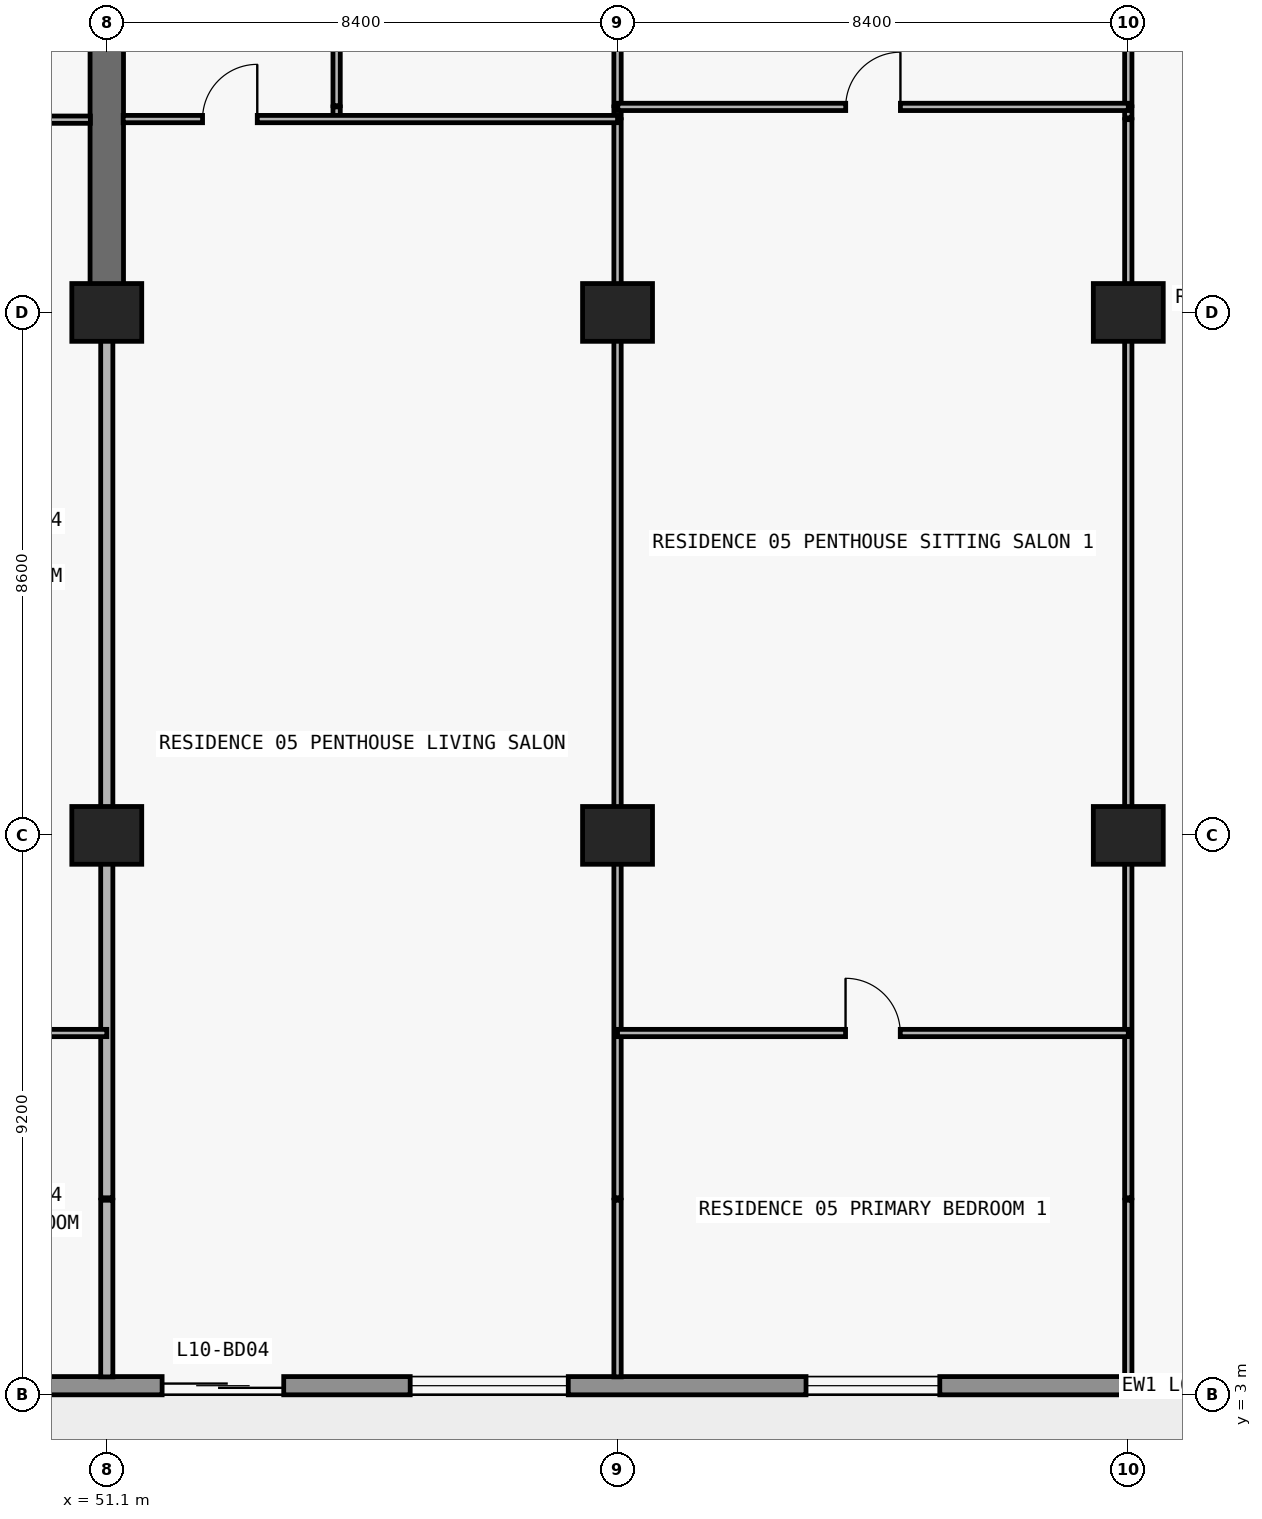
"""IFC4 building model, lengths in metres.
Left out: names, types, materials, properties, quantities, classifications, styles, units other than length and angle.
Written with IfcOpenShell. Run it as: python <this file> out.ifc"""

import sys

from ifc_helpers import new_model, si_unit, direction, frame, frame_2d, origin, origin_2d, place, context, subcontext, project, spatial, rectangle, extrude, element, fill, save


model = new_model("IFC4")
c1 = context("Model", 3, precision=1e-05, world=origin(), true_north=direction((0.0, 1.0)))
c2 = subcontext(c1, "Body", "Model", "MODEL_VIEW")
j1 = project(units=[si_unit("LENGTHUNIT", "METRE"), si_unit("PLANEANGLEUNIT", "RADIAN")], contexts=[c1])
p1 = place(None, origin())
s1 = spatial("IfcSite", under=j1, at=p1, CompositionType="ELEMENT")
p2 = place(p1, origin())
s2 = spatial("IfcBuilding", under=s1, at=p2, CompositionType="ELEMENT")
p3 = place(p2, frame((0.0, 0.0, 43.2)))
s3 = spatial("IfcBuildingStorey", under=s2, at=p3, CompositionType="ELEMENT", Elevation=43.2)
for number, where, z_axis, x_axis in (
    (1, (51.1, 12.2, 0.0), (0.0, 0.0, 1.0), (1.0, 0.0, 0.0)),
    (2, (59.5, 12.2, 0.0), (0.0, 0.0, 1.0), (1.0, 0.0, 0.0)),
    (3, (67.9, 12.2, 0.0), (0.0, 0.0, 1.0), (1.0, 0.0, 0.0)),
    (4, (51.1, 20.8, 0.0), (0.0, 0.0, 1.0), (1.0, 0.0, 0.0)),
    (5, (59.5, 20.8, 0.0), (0.0, 0.0, 1.0), (1.0, 0.0, 0.0)),
    (6, (67.9, 20.8, 0.0), (0.0, 0.0, 1.0), (1.0, 0.0, 0.0)),
):
    element("IfcColumn", number, at=place(p3, frame(where, z_axis=z_axis, x_axis=x_axis)), inside=s3, PredefinedType="COLUMN", context=c2, shape_type="SweptSolid", body=[
        extrude(rectangle(XDim=1.15, YDim=0.95, at=origin_2d()), origin(), (0.0, 0.0, 1.0), 3.05),
    ])
p4 = place(p3, frame((51.1, 20.8, 0.0), z_axis=(0.0, 0.0, 1.0), x_axis=(0.0, 1.0, 0.0)))
e7 = element("IfcWall", 7, at=p4, inside=s3, PredefinedType="SHEAR", context=c2, shape_type="SweptSolid", body=[
    extrude(rectangle(XDim=8.6, YDim=0.55, at=frame_2d((4.3, 0.0))), origin(), (0.0, 0.0, 1.0), 3.05),
])
p5 = place(p3, frame((72.7, 3.15, 0.0), z_axis=(0.0, 0.0, 1.0), x_axis=(-1.0, 0.0, 0.0)))
e8 = element("IfcWall", 8, at=p5, inside=s3, PredefinedType="STANDARD", context=c2, shape_type="SweptSolid", body=[
    extrude(rectangle(XDim=67.6, YDim=0.3, at=frame_2d((33.8, 0.0))), origin(), (0.0, 0.0, 1.0), 3.05),
])
p6 = place(p5, frame((59.89, 0.0, 0.0)))
e9 = element("IfcOpeningElement", 9, at=p6, cuts=e8, PredefinedType="OPENING", context=c2, shape_type="SweptSolid", body=[
    extrude(rectangle(XDim=2.0, YDim=2.3, at=frame_2d((1.0, 1.15))), frame((0.0, 0.16, 0.0), z_axis=(0.0, -1.0, 0.0), x_axis=(1.0, 0.0, 0.0)), (0.0, 0.0, 1.0), 0.32),
])
p7 = place(p5, frame((55.21, 0.0, 0.65)))
e10 = element("IfcOpeningElement", 10, at=p7, cuts=e8, PredefinedType="OPENING", context=c2, shape_type="SweptSolid", body=[
    extrude(rectangle(XDim=2.6, YDim=1.85, at=frame_2d((1.3, 0.925))), frame((0.0, 0.16, 0.0), z_axis=(0.0, -1.0, 0.0), x_axis=(1.0, 0.0, 0.0)), (0.0, 0.0, 1.0), 0.32),
])
p8 = place(p5, frame((49.1, 0.0, 0.85)))
e11 = element("IfcOpeningElement", 11, at=p8, cuts=e8, PredefinedType="OPENING", context=c2, shape_type="SweptSolid", body=[
    extrude(rectangle(XDim=2.2, YDim=1.55, at=frame_2d((1.1, 0.775))), frame((0.0, 0.16, 0.0), z_axis=(0.0, -1.0, 0.0), x_axis=(1.0, 0.0, 0.0)), (0.0, 0.0, 1.0), 0.32),
])
p9 = place(p5, frame((42.69, 0.0, 0.0)))
e12 = element("IfcOpeningElement", 12, at=p9, cuts=e8, PredefinedType="OPENING", context=c2, shape_type="SweptSolid", body=[
    extrude(rectangle(XDim=2.0, YDim=2.3, at=frame_2d((1.0, 1.15))), frame((0.0, 0.16, 0.0), z_axis=(0.0, -1.0, 0.0), x_axis=(1.0, 0.0, 0.0)), (0.0, 0.0, 1.0), 0.32),
])
p10 = place(p5, frame((38.59, 0.0, 0.85)))
e13 = element("IfcOpeningElement", 13, at=p10, cuts=e8, PredefinedType="OPENING", context=c2, shape_type="SweptSolid", body=[
    extrude(rectangle(XDim=1.8, YDim=1.55, at=frame_2d((0.9, 0.775))), frame((0.0, 0.16, 0.0), z_axis=(0.0, -1.0, 0.0), x_axis=(1.0, 0.0, 0.0)), (0.0, 0.0, 1.0), 0.32),
])
p11 = place(p5, frame((30.914, 0.0, 0.85)))
e14 = element("IfcOpeningElement", 14, at=p11, cuts=e8, PredefinedType="OPENING", context=c2, shape_type="SweptSolid", body=[
    extrude(rectangle(XDim=2.2, YDim=1.55, at=frame_2d((1.1, 0.775))), frame((0.0, 0.16, 0.0), z_axis=(0.0, -1.0, 0.0), x_axis=(1.0, 0.0, 0.0)), (0.0, 0.0, 1.0), 0.32),
])
p12 = place(p5, frame((26.69, 0.0, 0.0)))
e15 = element("IfcOpeningElement", 15, at=p12, cuts=e8, PredefinedType="OPENING", context=c2, shape_type="SweptSolid", body=[
    extrude(rectangle(XDim=2.0, YDim=2.3, at=frame_2d((1.0, 1.15))), frame((0.0, 0.16, 0.0), z_axis=(0.0, -1.0, 0.0), x_axis=(1.0, 0.0, 0.0)), (0.0, 0.0, 1.0), 0.32),
])
p13 = place(p5, frame((22.59, 0.0, 0.85)))
e16 = element("IfcOpeningElement", 16, at=p13, cuts=e8, PredefinedType="OPENING", context=c2, shape_type="SweptSolid", body=[
    extrude(rectangle(XDim=1.8, YDim=1.55, at=frame_2d((0.9, 0.775))), frame((0.0, 0.16, 0.0), z_axis=(0.0, -1.0, 0.0), x_axis=(1.0, 0.0, 0.0)), (0.0, 0.0, 1.0), 0.32),
])
p14 = place(p5, frame((18.69, 0.0, 0.0)))
e17 = element("IfcOpeningElement", 17, at=p14, cuts=e8, PredefinedType="OPENING", context=c2, shape_type="SweptSolid", body=[
    extrude(rectangle(XDim=2.0, YDim=2.3, at=frame_2d((1.0, 1.15))), frame((0.0, 0.16, 0.0), z_axis=(0.0, -1.0, 0.0), x_axis=(1.0, 0.0, 0.0)), (0.0, 0.0, 1.0), 0.32),
])
p15 = place(p5, frame((14.01, 0.0, 0.65)))
e18 = element("IfcOpeningElement", 18, at=p15, cuts=e8, PredefinedType="OPENING", context=c2, shape_type="SweptSolid", body=[
    extrude(rectangle(XDim=2.6, YDim=1.85, at=frame_2d((1.3, 0.925))), frame((0.0, 0.16, 0.0), z_axis=(0.0, -1.0, 0.0), x_axis=(1.0, 0.0, 0.0)), (0.0, 0.0, 1.0), 0.32),
])
p16 = place(p5, frame((7.9, 0.0, 0.85)))
e19 = element("IfcOpeningElement", 19, at=p16, cuts=e8, PredefinedType="OPENING", context=c2, shape_type="SweptSolid", body=[
    extrude(rectangle(XDim=2.2, YDim=1.55, at=frame_2d((1.1, 0.775))), frame((0.0, 0.16, 0.0), z_axis=(0.0, -1.0, 0.0), x_axis=(1.0, 0.0, 0.0)), (0.0, 0.0, 1.0), 0.32),
])
p17 = place(p3, frame((51.1, 3.295, 0.0), z_axis=(0.0, 0.0, 1.0), x_axis=(0.0, 1.0, 0.0)))
e20 = element("IfcWall", 20, at=p17, inside=s3, PredefinedType="PARTITIONING", context=c2, shape_type="SweptSolid", body=[
    extrude(rectangle(XDim=2.905, YDim=0.2, at=frame_2d((1.453, 0.0))), origin(), (0.0, 0.0, 1.0), 3.05),
])
p18 = place(p3, frame((51.1, 6.24, 0.0), z_axis=(0.0, 0.0, 1.0), x_axis=(0.0, 1.0, 0.0)))
e21 = element("IfcWall", 21, at=p18, inside=s3, PredefinedType="PARTITIONING", context=c2, shape_type="SweptSolid", body=[
    extrude(rectangle(XDim=14.555, YDim=0.2, at=frame_2d((7.277, 0.0))), origin(), (0.0, 0.0, 1.0), 2.11),
])
p19 = place(p3, frame((54.88, 24.0, 0.0), z_axis=(0.0, 0.0, 1.0), x_axis=(0.0, 1.0, 0.0)))
e22 = element("IfcWall", 22, at=p19, inside=s3, PredefinedType="PARTITIONING", context=c2, shape_type="SweptSolid", body=[
    extrude(rectangle(XDim=0.18, YDim=0.12, at=frame_2d((0.09, 0.0))), origin(), (0.0, 0.0, 1.0), 3.05),
])
p20 = place(p3, frame((54.88, 24.2, 0.0), z_axis=(0.0, 0.0, 1.0), x_axis=(0.0, 1.0, 0.0)))
e23 = element("IfcWall", 23, at=p20, inside=s3, PredefinedType="PARTITIONING", context=c2, shape_type="SweptSolid", body=[
    extrude(rectangle(XDim=4.38, YDim=0.12, at=frame_2d((2.19, 0.0))), origin(), (0.0, 0.0, 1.0), 3.05),
])
p21 = place(p20, frame((1.74, 0.0, 0.0)))
e24 = element("IfcOpeningElement", 24, at=p21, cuts=e23, PredefinedType="OPENING", context=c2, shape_type="SweptSolid", body=[
    extrude(rectangle(XDim=0.9, YDim=2.15, at=frame_2d((0.45, 1.075))), frame((0.0, 0.07, 0.0), z_axis=(0.0, -1.0, 0.0), x_axis=(1.0, 0.0, 0.0)), (0.0, 0.0, 1.0), 0.14),
])
p22 = place(p3, frame((59.5, 3.295, 0.0), z_axis=(0.0, 0.0, 1.0), x_axis=(0.0, 1.0, 0.0)))
e25 = element("IfcWall", 25, at=p22, inside=s3, PredefinedType="PARTITIONING", context=c2, shape_type="SweptSolid", body=[
    extrude(rectangle(XDim=2.905, YDim=0.12, at=frame_2d((1.453, 0.0))), origin(), (0.0, 0.0, 1.0), 3.05),
])
p23 = place(p3, frame((59.5, 6.24, 0.0), z_axis=(0.0, 0.0, 1.0), x_axis=(0.0, 1.0, 0.0)))
e26 = element("IfcWall", 26, at=p23, inside=s3, PredefinedType="PARTITIONING", context=c2, shape_type="SweptSolid", body=[
    extrude(rectangle(XDim=17.73, YDim=0.12, at=frame_2d((8.865, 0.0))), origin(), (0.0, 0.0, 1.0), 2.11),
])
p24 = place(p3, frame((59.5, 24.0, 0.0), z_axis=(0.0, 0.0, 1.0), x_axis=(0.0, 1.0, 0.0)))
e27 = element("IfcWall", 27, at=p24, inside=s3, PredefinedType="PARTITIONING", context=c2, shape_type="SweptSolid", body=[
    extrude(rectangle(XDim=0.18, YDim=0.12, at=frame_2d((0.09, 0.0))), origin(), (0.0, 0.0, 1.0), 2.11),
])
p25 = place(p3, frame((59.5, 24.2, 0.0), z_axis=(0.0, 0.0, 1.0), x_axis=(0.0, 1.0, 0.0)))
e28 = element("IfcWall", 28, at=p25, inside=s3, PredefinedType="PARTITIONING", context=c2, shape_type="SweptSolid", body=[
    extrude(rectangle(XDim=4.38, YDim=0.12, at=frame_2d((2.19, 0.0))), origin(), (0.0, 0.0, 1.0), 2.11),
])
p26 = place(p25, frame((1.74, 0.0, 0.0)))
e29 = element("IfcOpeningElement", 29, at=p26, cuts=e28, PredefinedType="OPENING", context=c2, shape_type="SweptSolid", body=[
    extrude(rectangle(XDim=0.9, YDim=2.06, at=frame_2d((0.45, 1.03))), frame((0.0, 0.07, 0.0), z_axis=(0.0, -1.0, 0.0), x_axis=(1.0, 0.0, 0.0)), (0.0, 0.0, 1.0), 0.14),
])
p27 = place(p3, frame((67.9, 3.295, 0.0), z_axis=(0.0, 0.0, 1.0), x_axis=(0.0, 1.0, 0.0)))
e30 = element("IfcWall", 30, at=p27, inside=s3, PredefinedType="PARTITIONING", context=c2, shape_type="SweptSolid", body=[
    extrude(rectangle(XDim=2.905, YDim=0.12, at=frame_2d((1.453, 0.0))), origin(), (0.0, 0.0, 1.0), 3.05),
])
p28 = place(p3, frame((67.9, 6.24, 0.0), z_axis=(0.0, 0.0, 1.0), x_axis=(0.0, 1.0, 0.0)))
e31 = element("IfcWall", 31, at=p28, inside=s3, PredefinedType="PARTITIONING", context=c2, shape_type="SweptSolid", body=[
    extrude(rectangle(XDim=17.73, YDim=0.12, at=frame_2d((8.865, 0.0))), origin(), (0.0, 0.0, 1.0), 2.11),
])
p29 = place(p3, frame((67.9, 24.0, 0.0), z_axis=(0.0, 0.0, 1.0), x_axis=(0.0, 1.0, 0.0)))
e32 = element("IfcWall", 32, at=p29, inside=s3, PredefinedType="PARTITIONING", context=c2, shape_type="SweptSolid", body=[
    extrude(rectangle(XDim=0.18, YDim=0.12, at=frame_2d((0.09, 0.0))), origin(), (0.0, 0.0, 1.0), 2.11),
])
p30 = place(p3, frame((67.9, 24.2, 0.0), z_axis=(0.0, 0.0, 1.0), x_axis=(0.0, 1.0, 0.0)))
e33 = element("IfcWall", 33, at=p30, inside=s3, PredefinedType="PARTITIONING", context=c2, shape_type="SweptSolid", body=[
    extrude(rectangle(XDim=4.38, YDim=0.12, at=frame_2d((2.19, 0.0))), origin(), (0.0, 0.0, 1.0), 2.11),
])
p31 = place(p30, frame((1.74, 0.0, 0.0)))
e34 = element("IfcOpeningElement", 34, at=p31, cuts=e33, PredefinedType="OPENING", context=c2, shape_type="SweptSolid", body=[
    extrude(rectangle(XDim=0.9, YDim=2.06, at=frame_2d((0.45, 1.03))), frame((0.0, 0.07, 0.0), z_axis=(0.0, -1.0, 0.0), x_axis=(1.0, 0.0, 0.0)), (0.0, 0.0, 1.0), 0.14),
])
p32 = place(p3, frame((47.32, 8.95, 0.0), z_axis=(0.0, 0.0, 1.0), x_axis=(1.0, 0.0, 0.0)))
e35 = element("IfcWall", 35, at=p32, inside=s3, PredefinedType="PARTITIONING", context=c2, shape_type="SweptSolid", body=[
    extrude(rectangle(XDim=3.78, YDim=0.12, at=frame_2d((1.89, 0.0))), origin(), (0.0, 0.0, 1.0), 3.05),
])
p33 = place(p32, frame((1.44, 0.0, 0.0)))
e36 = element("IfcOpeningElement", 36, at=p33, cuts=e35, PredefinedType="OPENING", context=c2, shape_type="SweptSolid", body=[
    extrude(rectangle(XDim=0.9, YDim=2.15, at=frame_2d((0.45, 1.075))), frame((0.0, 0.07, 0.0), z_axis=(0.0, -1.0, 0.0), x_axis=(1.0, 0.0, 0.0)), (0.0, 0.0, 1.0), 0.14),
])
p34 = place(p3, frame((59.5, 8.95, 0.0), z_axis=(0.0, 0.0, 1.0), x_axis=(1.0, 0.0, 0.0)))
e37 = element("IfcWall", 37, at=p34, inside=s3, PredefinedType="PARTITIONING", context=c2, shape_type="SweptSolid", body=[
    extrude(rectangle(XDim=8.4, YDim=0.12, at=frame_2d((4.2, 0.0))), origin(), (0.0, 0.0, 1.0), 3.05),
])
p35 = place(p34, frame((3.75, 0.0, 0.0)))
e38 = element("IfcOpeningElement", 38, at=p35, cuts=e37, PredefinedType="OPENING", context=c2, shape_type="SweptSolid", body=[
    extrude(rectangle(XDim=0.9, YDim=2.15, at=frame_2d((0.45, 1.075))), frame((0.0, 0.07, 0.0), z_axis=(0.0, -1.0, 0.0), x_axis=(1.0, 0.0, 0.0)), (0.0, 0.0, 1.0), 0.14),
])
p36 = place(p3, frame((42.7, 23.97, 0.0), z_axis=(0.0, 0.0, 1.0), x_axis=(1.0, 0.0, 0.0)))
e39 = element("IfcWall", 39, at=p36, inside=s3, PredefinedType="PARTITIONING", context=c2, shape_type="SweptSolid", body=[
    extrude(rectangle(XDim=8.13, YDim=0.12, at=frame_2d((4.065, 0.0))), origin(), (0.0, 0.0, 1.0), 3.05),
])
p37 = place(p36, frame((1.86, 0.0, 0.0)))
e40 = element("IfcOpeningElement", 40, at=p37, cuts=e39, PredefinedType="OPENING", context=c2, shape_type="SweptSolid", body=[
    extrude(rectangle(XDim=0.9, YDim=2.15, at=frame_2d((0.45, 1.075))), frame((0.0, 0.07, 0.0), z_axis=(0.0, -1.0, 0.0), x_axis=(1.0, 0.0, 0.0)), (0.0, 0.0, 1.0), 0.14),
])
p38 = place(p36, frame((6.008, 0.0, 0.0)))
e41 = element("IfcOpeningElement", 41, at=p38, cuts=e39, PredefinedType="OPENING", context=c2, shape_type="SweptSolid", body=[
    extrude(rectangle(XDim=0.9, YDim=2.15, at=frame_2d((0.45, 1.075))), frame((0.0, 0.07, 0.0), z_axis=(0.0, -1.0, 0.0), x_axis=(1.0, 0.0, 0.0)), (0.0, 0.0, 1.0), 0.14),
])
p39 = place(p3, frame((51.37, 23.98, 0.0), z_axis=(0.0, 0.0, 1.0), x_axis=(1.0, 0.0, 0.0)))
e42 = element("IfcWall", 42, at=p39, inside=s3, PredefinedType="PARTITIONING", context=c2, shape_type="SweptSolid", body=[
    extrude(rectangle(XDim=8.13, YDim=0.12, at=frame_2d((4.065, 0.0))), origin(), (0.0, 0.0, 1.0), 3.05),
])
p40 = place(p39, frame((1.305, 0.0, 0.0)))
e43 = element("IfcOpeningElement", 43, at=p40, cuts=e42, PredefinedType="OPENING", context=c2, shape_type="SweptSolid", body=[
    extrude(rectangle(XDim=0.9, YDim=2.15, at=frame_2d((0.45, 1.075))), frame((0.0, 0.07, 0.0), z_axis=(0.0, -1.0, 0.0), x_axis=(1.0, 0.0, 0.0)), (0.0, 0.0, 1.0), 0.14),
])
p41 = place(p3, frame((59.505, 24.18, 0.0), z_axis=(0.0, 0.0, 1.0), x_axis=(1.0, 0.0, 0.0)))
e44 = element("IfcWall", 44, at=p41, inside=s3, PredefinedType="PARTITIONING", context=c2, shape_type="SweptSolid", body=[
    extrude(rectangle(XDim=8.395, YDim=0.12, at=frame_2d((4.198, 0.0))), origin(), (0.0, 0.0, 1.0), 3.05),
])
p42 = place(p41, frame((3.748, 0.0, 0.0)))
e45 = element("IfcOpeningElement", 45, at=p42, cuts=e44, PredefinedType="OPENING", context=c2, shape_type="SweptSolid", body=[
    extrude(rectangle(XDim=0.9, YDim=2.15, at=frame_2d((0.45, 1.075))), frame((0.0, 0.07, 0.0), z_axis=(0.0, -1.0, 0.0), x_axis=(1.0, 0.0, 0.0)), (0.0, 0.0, 1.0), 0.14),
])
p43 = place(p14, origin())
e46 = element("IfcDoor", 46, at=p43, inside=s3, OperationType="DOUBLE_DOOR_SLIDING", PredefinedType="DOOR", context=c2, shape_type="SweptSolid", body=[
    extrude(rectangle(XDim=2.0, YDim=2.3, at=frame_2d((1.0, 1.15))), frame((0.0, 0.025, 0.0), z_axis=(0.0, -1.0, 0.0), x_axis=(1.0, 0.0, 0.0)), (0.0, 0.0, 1.0), 0.05),
])
fill(e17, e46)
p44 = place(p15, origin())
e47 = element("IfcWindow", 47, at=p44, inside=s3, PartitioningType="SINGLE_PANEL", PredefinedType="WINDOW", context=c2, shape_type="SweptSolid", body=[
    extrude(rectangle(XDim=2.6, YDim=1.85, at=frame_2d((1.3, 0.925))), frame((0.0, 0.03, 0.0), z_axis=(0.0, -1.0, 0.0), x_axis=(1.0, 0.0, 0.0)), (0.0, 0.0, 1.0), 0.06),
])
fill(e18, e47)
p45 = place(p16, origin())
e48 = element("IfcWindow", 48, at=p45, inside=s3, PartitioningType="SINGLE_PANEL", PredefinedType="WINDOW", context=c2, shape_type="SweptSolid", body=[
    extrude(rectangle(XDim=2.2, YDim=1.55, at=frame_2d((1.1, 0.775))), frame((0.0, 0.03, 0.0), z_axis=(0.0, -1.0, 0.0), x_axis=(1.0, 0.0, 0.0)), (0.0, 0.0, 1.0), 0.06),
])
fill(e19, e48)
p46 = place(p40, origin())
e49 = element("IfcDoor", 49, at=p46, inside=s3, OperationType="SINGLE_SWING_RIGHT", PredefinedType="DOOR", context=c2, shape_type="SweptSolid", body=[
    extrude(rectangle(XDim=0.9, YDim=2.15, at=frame_2d((0.45, 1.075))), frame((0.0, 0.025, 0.0), z_axis=(0.0, -1.0, 0.0), x_axis=(1.0, 0.0, 0.0)), (0.0, 0.0, 1.0), 0.05),
])
fill(e43, e49)
p47 = place(p42, origin())
e50 = element("IfcDoor", 50, at=p47, inside=s3, OperationType="SINGLE_SWING_RIGHT", PredefinedType="DOOR", context=c2, shape_type="SweptSolid", body=[
    extrude(rectangle(XDim=0.9, YDim=2.15, at=frame_2d((0.45, 1.075))), frame((0.0, 0.025, 0.0), z_axis=(0.0, -1.0, 0.0), x_axis=(1.0, 0.0, 0.0)), (0.0, 0.0, 1.0), 0.05),
])
fill(e45, e50)
p48 = place(p35, origin())
e51 = element("IfcDoor", 51, at=p48, inside=s3, OperationType="SINGLE_SWING_LEFT", PredefinedType="DOOR", context=c2, shape_type="SweptSolid", body=[
    extrude(rectangle(XDim=0.9, YDim=2.15, at=frame_2d((0.45, 1.075))), frame((0.0, 0.025, 0.0), z_axis=(0.0, -1.0, 0.0), x_axis=(1.0, 0.0, 0.0)), (0.0, 0.0, 1.0), 0.05),
])
fill(e38, e51)
save(model, sys.argv[1])
